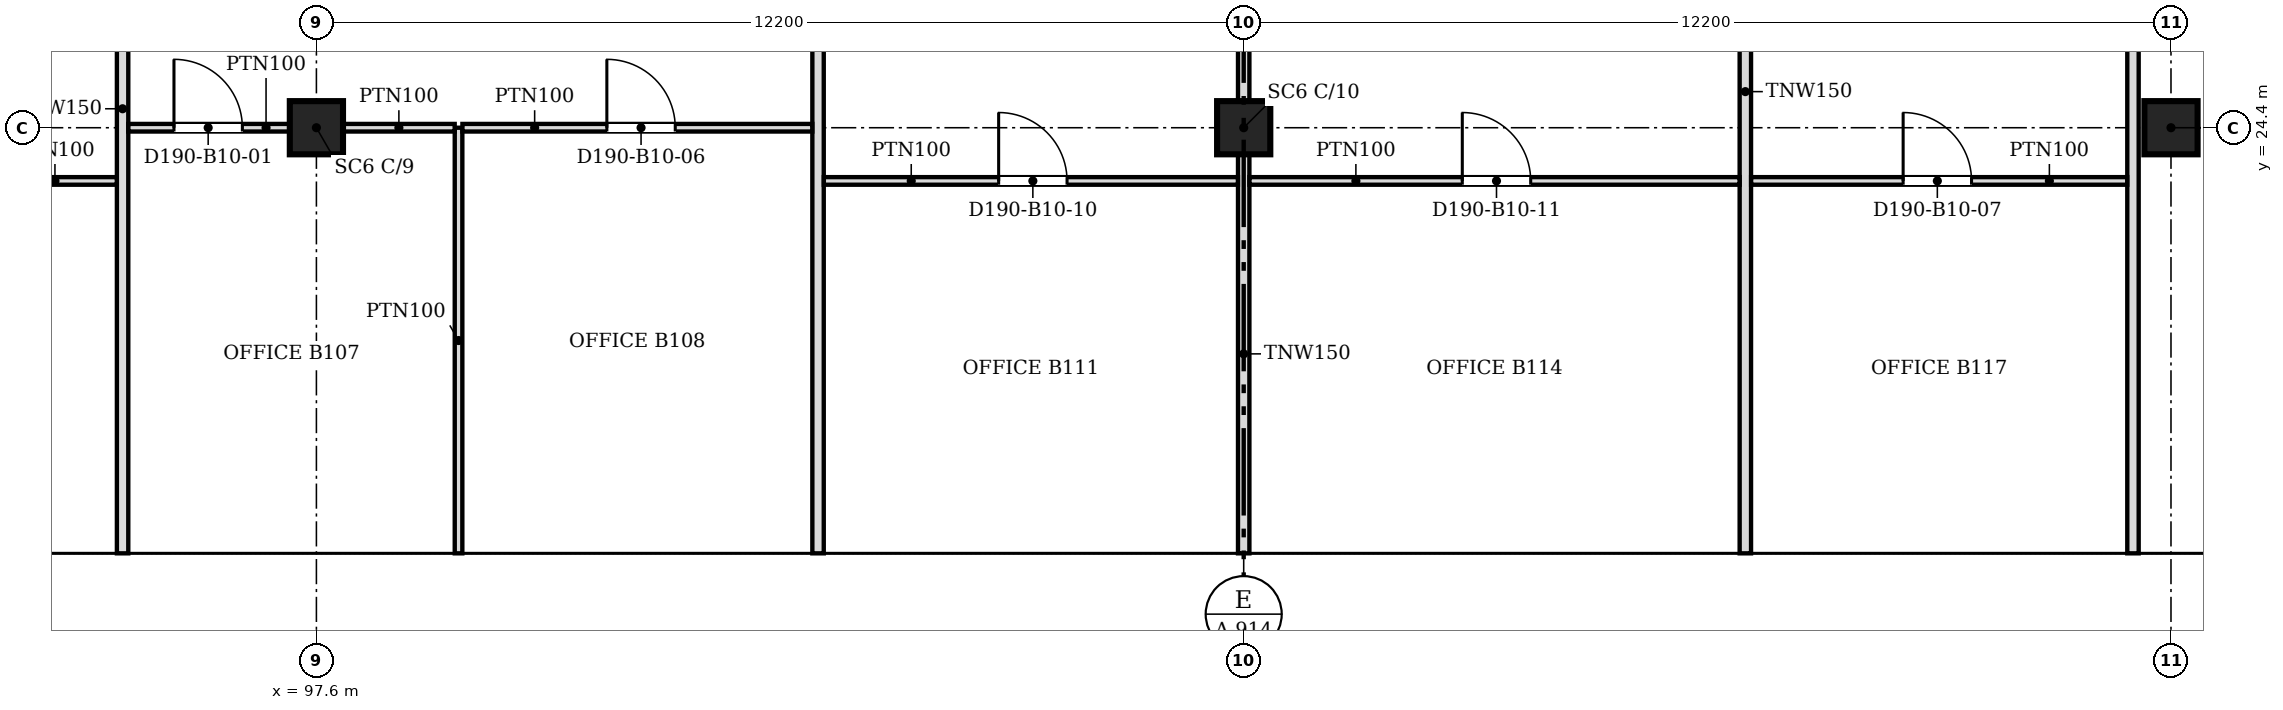
"""IFC4 building model, lengths in metres.
Left out: names, types, materials, properties, quantities, classifications, styles, units other than length and angle.
Written with IfcOpenShell. Run it as: python <this file> out.ifc"""

import sys

from ifc_helpers import new_model, si_unit, direction, frame, frame_2d, origin, origin_2d, place, context, subcontext, project, spatial, polyline, rectangle, outline, extrude, faceted_brep, source, transform, mapped, element, fill, save


model = new_model("IFC4")
c1 = context("Model", 3, precision=1e-05, world=origin(), true_north=direction((0.0, 1.0)))
c2 = subcontext(c1, "Body", "Model", "MODEL_VIEW")
j1 = project(units=[si_unit("LENGTHUNIT", "METRE"), si_unit("PLANEANGLEUNIT", "RADIAN")], contexts=[c1])
p1 = place(None, origin())
s1 = spatial("IfcSite", under=j1, at=p1, CompositionType="ELEMENT")
p2 = place(p1, origin())
s2 = spatial("IfcBuilding", under=s1, at=p2, CompositionType="ELEMENT")
p3 = place(p2, frame((0.0, 0.0, 102.8)))
s3 = spatial("IfcBuildingStorey", under=s2, at=p3, CompositionType="ELEMENT", Elevation=102.8)
for number, where, z_axis, x_axis in (
    (1, (97.6, 24.4, 0.0), (0.0, 0.0, 1.0), (1.0, 0.0, 0.0)),
    (2, (109.8, 24.4, 0.0), (0.0, 0.0, 1.0), (1.0, 0.0, 0.0)),
    (3, (122.0, 24.4, 0.0), (0.0, 0.0, 1.0), (1.0, 0.0, 0.0)),
):
    element("IfcColumn", number, at=place(p3, frame(where, z_axis=z_axis, x_axis=x_axis)), inside=s3, PredefinedType="COLUMN", context=c2, shape_type="SweptSolid", body=[
        extrude(rectangle(XDim=0.7, YDim=0.7, at=origin_2d()), origin(), (0.0, 0.0, 1.0), 3.55),
    ])
m1 = source(origin(), c2, "Body", "Brep", [
    faceted_brep([(0.047, -0.25, 0.0), (3.05, -0.25, 3.8), (0.047, -0.25, 7.6), (0.0, -0.25, 7.54), (0.0, -0.25, 0.06), (0.093, 0.25, 7.541), (3.05, 0.25, 3.8), (0.093, 0.25, 0.059), (0.047, 0.0, 0.0), (0.047, 0.0, 7.6)], [[[0, 1, 2, 3, 4]], [[5, 6, 7]], [[7, 6, 1, 0, 8]], [[6, 5, 9, 2, 1]], [[3, 2, 9]], [[8, 0, 4]], [[7, 8, 4, 3, 9, 5]]]),
])
p4 = place(p3, frame((91.5, 18.55, -3.8), z_axis=(0.0, 0.0, 1.0), x_axis=(1.0, 0.0, 0.0)))
e4 = element("IfcWall", 4, at=p4, inside=s3, PredefinedType="SOLIDWALL", context=c2, shape_type="MappedRepresentation", body=[
    mapped(m1, transform((0.0, 0.0, 0.0), scale=1.0)),
])
m2 = source(origin(), c2, "Body", "SweptSolid", [
    extrude(outline(polyline([(0.247, 0.656), (2.731, 3.8), (0.247, 6.944), (0.247, 0.656)])), frame((0.0, 0.26, 0.0), z_axis=(0.0, -1.0, 0.0), x_axis=(1.0, 0.0, 0.0)), (0.0, 0.0, 1.0), 0.52),
])
p5 = place(p4, origin())
e5 = element("IfcOpeningElement", 5, at=p5, cuts=e4, PredefinedType="OPENING", context=c2, shape_type="MappedRepresentation", body=[
    mapped(m2, transform((0.0, 0.0, 0.0), scale=1.0)),
])
m3 = source(origin(), c2, "Body", "Brep", [
    faceted_brep([(3.05, -0.25, 0.0), (6.1, -0.25, 3.8), (6.1, -0.25, 3.8), (3.05, -0.25, 7.6), (0.0, -0.25, 3.8), (0.0, 0.25, 3.8), (3.05, 0.25, 7.6), (6.1, 0.25, 3.8), (6.1, 0.25, 3.8), (3.05, 0.25, 0.0)], [[[0, 1, 2, 3, 4]], [[5, 6, 7, 8, 9]], [[9, 8, 1, 0]], [[7, 6, 3, 2]], [[6, 5, 4, 3]], [[5, 9, 0, 4]], [[1, 8, 7, 2]]]),
])
p6 = place(p3, frame((94.55, 18.55, -3.8), z_axis=(0.0, 0.0, 1.0), x_axis=(1.0, 0.0, 0.0)))
e6 = element("IfcWall", 6, at=p6, inside=s3, PredefinedType="SOLIDWALL", context=c2, shape_type="MappedRepresentation", body=[
    mapped(m3, transform((0.0, 0.0, 0.0), scale=1.0)),
])
m4 = source(origin(), c2, "Body", "SweptSolid", [
    extrude(outline(polyline([(3.05, 0.399), (5.78, 3.8), (3.05, 7.201), (0.321, 3.8), (3.05, 0.399)])), frame((0.0, 0.26, 0.0), z_axis=(0.0, -1.0, 0.0), x_axis=(1.0, 0.0, 0.0)), (0.0, 0.0, 1.0), 0.52),
])
p7 = place(p6, origin())
e7 = element("IfcOpeningElement", 7, at=p7, cuts=e6, PredefinedType="OPENING", context=c2, shape_type="MappedRepresentation", body=[
    mapped(m4, transform((0.0, 0.0, 0.0), scale=1.0)),
])
m5 = source(origin(), c2, "Body", "SweptSolid", [
    extrude(outline(polyline([(3.05, 0.0), (6.1, 3.8), (3.05, 7.6), (0.0, 3.8), (3.05, 0.0)])), frame((0.0, 0.25, 0.0), z_axis=(0.0, -1.0, 0.0), x_axis=(1.0, 0.0, 0.0)), (0.0, 0.0, 1.0), 0.5),
])
p8 = place(p3, frame((100.65, 18.55, -3.8), z_axis=(0.0, 0.0, 1.0), x_axis=(1.0, 0.0, 0.0)))
e8 = element("IfcWall", 8, at=p8, inside=s3, PredefinedType="SOLIDWALL", context=c2, shape_type="MappedRepresentation", body=[
    mapped(m5, transform((0.0, 0.0, 0.0), scale=1.0)),
])
p9 = place(p8, origin())
e9 = element("IfcOpeningElement", 9, at=p9, cuts=e8, PredefinedType="OPENING", context=c2, shape_type="MappedRepresentation", body=[
    mapped(m4, transform((0.0, 0.0, 0.0), scale=1.0)),
])
p10 = place(p3, frame((106.75, 18.55, -3.8), z_axis=(0.0, 0.0, 1.0), x_axis=(1.0, 0.0, 0.0)))
e10 = element("IfcWall", 10, at=p10, inside=s3, PredefinedType="SOLIDWALL", context=c2, shape_type="MappedRepresentation", body=[
    mapped(m5, transform((0.0, 0.0, 0.0), scale=1.0)),
])
p11 = place(p10, origin())
e11 = element("IfcOpeningElement", 11, at=p11, cuts=e10, PredefinedType="OPENING", context=c2, shape_type="MappedRepresentation", body=[
    mapped(m4, transform((0.0, 0.0, 0.0), scale=1.0)),
])
p12 = place(p3, frame((112.85, 18.55, -3.8), z_axis=(0.0, 0.0, 1.0), x_axis=(1.0, 0.0, 0.0)))
e12 = element("IfcWall", 12, at=p12, inside=s3, PredefinedType="SOLIDWALL", context=c2, shape_type="MappedRepresentation", body=[
    mapped(m3, transform((0.0, 0.0, 0.0), scale=1.0)),
])
p13 = place(p12, origin())
e13 = element("IfcOpeningElement", 13, at=p13, cuts=e12, PredefinedType="OPENING", context=c2, shape_type="MappedRepresentation", body=[
    mapped(m4, transform((0.0, 0.0, 0.0), scale=1.0)),
])
m6 = source(origin(), c2, "Body", "Brep", [
    faceted_brep([(3.05, -0.25, 0.0), (5.85, -0.25, 3.8), (3.05, -0.25, 7.6), (0.0, -0.25, 3.8), (0.0, 0.25, 3.8), (3.05, 0.25, 7.6), (5.6, 0.25, 4.139), (5.6, 0.25, 3.461), (3.05, 0.25, 0.0), (5.85, 0.0, 3.8)], [[[0, 1, 2, 3]], [[4, 5, 6, 7, 8]], [[8, 7, 9, 1, 0]], [[6, 5, 2, 1, 9]], [[5, 4, 3, 2]], [[4, 8, 0, 3]], [[9, 7, 6]]]),
])
p14 = place(p3, frame((118.95, 18.55, -3.8), z_axis=(0.0, 0.0, 1.0), x_axis=(1.0, 0.0, 0.0)))
e14 = element("IfcWall", 14, at=p14, inside=s3, PredefinedType="SOLIDWALL", context=c2, shape_type="MappedRepresentation", body=[
    mapped(m6, transform((0.0, 0.0, 0.0), scale=1.0)),
])
m7 = source(origin(), c2, "Body", "SweptSolid", [
    extrude(outline(polyline([(3.042, 0.41), (5.54, 3.8), (3.042, 7.19), (0.321, 3.8), (3.042, 0.41)])), frame((0.0, 0.26, 0.0), z_axis=(0.0, -1.0, 0.0), x_axis=(1.0, 0.0, 0.0)), (0.0, 0.0, 1.0), 0.52),
])
p15 = place(p14, origin())
e15 = element("IfcOpeningElement", 15, at=p15, cuts=e14, PredefinedType="OPENING", context=c2, shape_type="MappedRepresentation", body=[
    mapped(m7, transform((0.0, 0.0, 0.0), scale=1.0)),
])
m8 = source(origin(), c2, "Body", "Brep", [
    faceted_brep([(3.003, -0.25, 0.0), (6.053, -0.25, 3.8), (0.0, -0.25, 3.8), (0.047, 0.25, 3.8), (6.053, 0.25, 3.8), (3.003, 0.25, 0.0), (0.047, 0.25, 3.741), (0.0, 0.0, 3.8)], [[[0, 1, 2]], [[3, 4, 5, 6]], [[5, 4, 1, 0]], [[4, 3, 7, 2, 1]], [[6, 5, 0, 2, 7]], [[6, 7, 3]]]),
])
p16 = place(p3, frame((91.547, 18.55, 0.0), z_axis=(0.0, 0.0, 1.0), x_axis=(1.0, 0.0, 0.0)))
e16 = element("IfcWall", 16, at=p16, inside=s3, PredefinedType="SOLIDWALL", context=c2, shape_type="MappedRepresentation", body=[
    mapped(m8, transform((0.0, 0.0, 0.0), scale=1.0)),
])
m9 = source(origin(), c2, "Body", "SweptSolid", [
    extrude(outline(polyline([(3.005, 0.401), (5.532, 3.55), (0.516, 3.55), (3.005, 0.401)])), frame((0.0, 0.26, 0.0), z_axis=(0.0, -1.0, 0.0), x_axis=(1.0, 0.0, 0.0)), (0.0, 0.0, 1.0), 0.52),
])
p17 = place(p16, origin())
e17 = element("IfcOpeningElement", 17, at=p17, cuts=e16, PredefinedType="OPENING", context=c2, shape_type="MappedRepresentation", body=[
    mapped(m9, transform((0.0, 0.0, 0.0), scale=1.0)),
])
m10 = source(origin(), c2, "Body", "Brep", [
    faceted_brep([(3.05, -0.25, 0.0), (6.1, -0.25, 3.8), (6.1, -0.25, 3.8), (0.0, -0.25, 3.8), (0.0, 0.25, 3.8), (6.1, 0.25, 3.8), (6.1, 0.25, 3.8), (3.05, 0.25, 0.0)], [[[0, 1, 2, 3]], [[4, 5, 6, 7]], [[7, 6, 1, 0]], [[5, 4, 3, 2]], [[4, 7, 0, 3]], [[1, 6, 5, 2]]]),
])
p18 = place(p3, frame((97.6, 18.55, 0.0), z_axis=(0.0, 0.0, 1.0), x_axis=(1.0, 0.0, 0.0)))
e18 = element("IfcWall", 18, at=p18, inside=s3, PredefinedType="SOLIDWALL", context=c2, shape_type="MappedRepresentation", body=[
    mapped(m10, transform((0.0, 0.0, 0.0), scale=1.0)),
])
m11 = source(origin(), c2, "Body", "SweptSolid", [
    extrude(outline(polyline([(3.05, 0.399), (5.579, 3.55), (0.521, 3.55), (3.05, 0.399)])), frame((0.0, 0.26, 0.0), z_axis=(0.0, -1.0, 0.0), x_axis=(1.0, 0.0, 0.0)), (0.0, 0.0, 1.0), 0.52),
])
p19 = place(p18, origin())
e19 = element("IfcOpeningElement", 19, at=p19, cuts=e18, PredefinedType="OPENING", context=c2, shape_type="MappedRepresentation", body=[
    mapped(m11, transform((0.0, 0.0, 0.0), scale=1.0)),
])
m12 = source(origin(), c2, "Body", "SweptSolid", [
    extrude(outline(polyline([(3.05, 0.0), (6.1, 3.8), (0.0, 3.8), (3.05, 0.0)])), frame((0.0, 0.25, 0.0), z_axis=(0.0, -1.0, 0.0), x_axis=(1.0, 0.0, 0.0)), (0.0, 0.0, 1.0), 0.5),
])
p20 = place(p3, frame((103.7, 18.55, 0.0), z_axis=(0.0, 0.0, 1.0), x_axis=(1.0, 0.0, 0.0)))
e20 = element("IfcWall", 20, at=p20, inside=s3, PredefinedType="SOLIDWALL", context=c2, shape_type="MappedRepresentation", body=[
    mapped(m12, transform((0.0, 0.0, 0.0), scale=1.0)),
])
p21 = place(p20, origin())
e21 = element("IfcOpeningElement", 21, at=p21, cuts=e20, PredefinedType="OPENING", context=c2, shape_type="MappedRepresentation", body=[
    mapped(m11, transform((0.0, 0.0, 0.0), scale=1.0)),
])
p22 = place(p3, frame((109.8, 18.55, 0.0), z_axis=(0.0, 0.0, 1.0), x_axis=(1.0, 0.0, 0.0)))
e22 = element("IfcWall", 22, at=p22, inside=s3, PredefinedType="SOLIDWALL", context=c2, shape_type="MappedRepresentation", body=[
    mapped(m10, transform((0.0, 0.0, 0.0), scale=1.0)),
])
p23 = place(p22, origin())
e23 = element("IfcOpeningElement", 23, at=p23, cuts=e22, PredefinedType="OPENING", context=c2, shape_type="MappedRepresentation", body=[
    mapped(m11, transform((0.0, 0.0, 0.0), scale=1.0)),
])
p24 = place(p3, frame((115.9, 18.55, 0.0), z_axis=(0.0, 0.0, 1.0), x_axis=(1.0, 0.0, 0.0)))
e24 = element("IfcWall", 24, at=p24, inside=s3, PredefinedType="SOLIDWALL", context=c2, shape_type="MappedRepresentation", body=[
    mapped(m12, transform((0.0, 0.0, 0.0), scale=1.0)),
])
p25 = place(p24, origin())
e25 = element("IfcOpeningElement", 25, at=p25, cuts=e24, PredefinedType="OPENING", context=c2, shape_type="MappedRepresentation", body=[
    mapped(m11, transform((0.0, 0.0, 0.0), scale=1.0)),
])
m13 = source(origin(), c2, "Body", "Brep", [
    faceted_brep([(2.8, -0.25, 0.0), (3.05, -0.25, 0.339), (3.05, -0.25, 3.8), (0.0, -0.25, 3.8), (0.0, 0.25, 3.8), (2.55, 0.25, 3.8), (2.55, 0.25, 0.339), (2.8, 0.0, 0.0)], [[[0, 1, 2, 3]], [[4, 5, 6]], [[1, 0, 7]], [[5, 4, 3, 2]], [[4, 6, 7, 0, 3]], [[1, 7, 6, 5, 2]]]),
])
p26 = place(p3, frame((122.0, 18.55, 0.0), z_axis=(0.0, 0.0, 1.0), x_axis=(1.0, 0.0, 0.0)))
e26 = element("IfcWall", 26, at=p26, inside=s3, PredefinedType="SOLIDWALL", context=c2, shape_type="MappedRepresentation", body=[
    mapped(m13, transform((0.0, 0.0, 0.0), scale=1.0)),
])
m14 = source(origin(), c2, "Body", "SweptSolid", [
    extrude(outline(polyline([(2.6, 3.55), (0.495, 3.55), (2.6, 0.693), (2.6, 3.55)])), frame((0.0, 0.26, 0.0), z_axis=(0.0, -1.0, 0.0), x_axis=(1.0, 0.0, 0.0)), (0.0, 0.0, 1.0), 0.52),
])
p27 = place(p26, origin())
e27 = element("IfcOpeningElement", 27, at=p27, cuts=e26, PredefinedType="OPENING", context=c2, shape_type="MappedRepresentation", body=[
    mapped(m14, transform((0.0, 0.0, 0.0), scale=1.0)),
])
p28 = place(p3, frame((95.05, 18.8, 0.0), z_axis=(0.0, 0.0, 1.0), x_axis=(0.0, 1.0, 0.0)))
e28 = element("IfcWall", 28, at=p28, inside=s3, PredefinedType="PARTITIONING", context=c2, shape_type="SweptSolid", body=[
    extrude(rectangle(XDim=11.699, YDim=0.15, at=frame_2d((5.85, 0.0))), origin(), (0.0, 0.0, 1.0), 2.715),
])
p29 = place(p3, frame((99.47, 18.8, 0.0), z_axis=(0.0, 0.0, 1.0), x_axis=(0.0, 1.0, 0.0)))
e29 = element("IfcWall", 29, at=p29, inside=s3, PredefinedType="PARTITIONING", context=c2, shape_type="SweptSolid", body=[
    extrude(rectangle(XDim=5.6, YDim=0.1, at=frame_2d((2.8, 0.0))), origin(), (0.0, 0.0, 1.0), 2.715),
])
p30 = place(p3, frame((104.2, 18.8, 0.0), z_axis=(0.0, 0.0, 1.0), x_axis=(0.0, 1.0, 0.0)))
e30 = element("IfcWall", 30, at=p30, inside=s3, PredefinedType="PARTITIONING", context=c2, shape_type="SweptSolid", body=[
    extrude(rectangle(XDim=15.124, YDim=0.15, at=frame_2d((7.562, 0.0))), origin(), (0.0, 0.0, 1.0), 2.715),
])
p31 = place(p3, frame((109.8, 18.8, 0.0), z_axis=(0.0, 0.0, 1.0), x_axis=(0.0, 1.0, 0.0)))
e31 = element("IfcWall", 31, at=p31, inside=s3, PredefinedType="PARTITIONING", context=c2, shape_type="SweptSolid", body=[
    extrude(rectangle(XDim=5.249, YDim=0.15, at=frame_2d((2.625, 0.0))), origin(), (0.0, 0.0, 1.0), 2.715),
])
p32 = place(p3, frame((116.4, 18.8, 0.0), z_axis=(0.0, 0.0, 1.0), x_axis=(0.0, 1.0, 0.0)))
e32 = element("IfcWall", 32, at=p32, inside=s3, PredefinedType="PARTITIONING", context=c2, shape_type="SweptSolid", body=[
    extrude(rectangle(XDim=12.15, YDim=0.15, at=frame_2d((6.075, 0.0))), origin(), (0.0, 0.0, 1.0), 2.715),
])
p33 = place(p3, frame((121.5, 18.8, 0.0), z_axis=(0.0, 0.0, 1.0), x_axis=(0.0, 1.0, 0.0)))
e33 = element("IfcWall", 33, at=p33, inside=s3, PredefinedType="PARTITIONING", context=c2, shape_type="SweptSolid", body=[
    extrude(rectangle(XDim=15.124, YDim=0.15, at=frame_2d((7.562, 0.0))), origin(), (0.0, 0.0, 1.0), 2.715),
])
p34 = place(p3, frame((94.974, 23.7, 0.0), z_axis=(0.0, 0.0, 1.0), x_axis=(-1.0, 0.0, 0.0)))
e34 = element("IfcWall", 34, at=p34, inside=s3, PredefinedType="PARTITIONING", context=c2, shape_type="SweptSolid", body=[
    extrude(rectangle(XDim=4.128, YDim=0.1, at=frame_2d((2.064, 0.0))), origin(), (0.0, 0.0, 1.0), 2.715),
])
m15 = source(origin(), c2, "Body", "SweptSolid", [
    extrude(rectangle(XDim=0.9, YDim=2.1, at=frame_2d((0.45, 1.05))), frame((0.0, 0.06, 0.0), z_axis=(0.0, -1.0, 0.0), x_axis=(1.0, 0.0, 0.0)), (0.0, 0.0, 1.0), 0.12),
])
p35 = place(p34, frame((1.628, 0.0, 0.0)))
e35 = element("IfcOpeningElement", 35, at=p35, cuts=e34, PredefinedType="OPENING", context=c2, shape_type="MappedRepresentation", body=[
    mapped(m15, transform((0.0, 0.0, 0.0), scale=1.0)),
])
p36 = place(p3, frame((109.724, 23.7, 0.0), z_axis=(0.0, 0.0, 1.0), x_axis=(-1.0, 0.0, 0.0)))
e36 = element("IfcWall", 36, at=p36, inside=s3, PredefinedType="PARTITIONING", context=c2, shape_type="SweptSolid", body=[
    extrude(rectangle(XDim=5.448, YDim=0.1, at=frame_2d((2.724, 0.0))), origin(), (0.0, 0.0, 1.0), 2.715),
])
p37 = place(p36, frame((2.248, 0.0, 0.0)))
e37 = element("IfcOpeningElement", 37, at=p37, cuts=e36, PredefinedType="OPENING", context=c2, shape_type="MappedRepresentation", body=[
    mapped(m15, transform((0.0, 0.0, 0.0), scale=1.0)),
])
p38 = place(p3, frame((116.324, 23.7, 0.0), z_axis=(0.0, 0.0, 1.0), x_axis=(-1.0, 0.0, 0.0)))
e38 = element("IfcWall", 38, at=p38, inside=s3, PredefinedType="PARTITIONING", context=c2, shape_type="SweptSolid", body=[
    extrude(rectangle(XDim=6.448, YDim=0.1, at=frame_2d((3.224, 0.0))), origin(), (0.0, 0.0, 1.0), 2.715),
])
p39 = place(p38, frame((2.748, 0.0, 0.0)))
e39 = element("IfcOpeningElement", 39, at=p39, cuts=e38, PredefinedType="OPENING", context=c2, shape_type="MappedRepresentation", body=[
    mapped(m15, transform((0.0, 0.0, 0.0), scale=1.0)),
])
p40 = place(p3, frame((121.424, 23.7, 0.0), z_axis=(0.0, 0.0, 1.0), x_axis=(-1.0, 0.0, 0.0)))
e40 = element("IfcWall", 40, at=p40, inside=s3, PredefinedType="PARTITIONING", context=c2, shape_type="SweptSolid", body=[
    extrude(rectangle(XDim=4.948, YDim=0.1, at=frame_2d((2.474, 0.0))), origin(), (0.0, 0.0, 1.0), 2.715),
])
p41 = place(p40, frame((2.048, 0.0, 0.0)))
e41 = element("IfcOpeningElement", 41, at=p41, cuts=e40, PredefinedType="OPENING", context=c2, shape_type="MappedRepresentation", body=[
    mapped(m15, transform((0.0, 0.0, 0.0), scale=1.0)),
])
p42 = place(p3, frame((97.249, 24.4, 0.0), z_axis=(0.0, 0.0, 1.0), x_axis=(-1.0, 0.0, 0.0)))
e42 = element("IfcWall", 42, at=p42, inside=s3, PredefinedType="PARTITIONING", context=c2, shape_type="SweptSolid", body=[
    extrude(rectangle(XDim=2.123, YDim=0.1, at=frame_2d((1.062, 0.0))), origin(), (0.0, 0.0, 1.0), 2.715),
])
p43 = place(p42, frame((0.623, 0.0, 0.0)))
e43 = element("IfcOpeningElement", 43, at=p43, cuts=e42, PredefinedType="OPENING", context=c2, shape_type="MappedRepresentation", body=[
    mapped(m15, transform((0.0, 0.0, 0.0), scale=1.0)),
])
p44 = place(p3, frame((97.951, 24.4, 0.0), z_axis=(0.0, 0.0, 1.0), x_axis=(1.0, 0.0, 0.0)))
e44 = element("IfcWall", 44, at=p44, inside=s3, PredefinedType="PARTITIONING", context=c2, shape_type="SweptSolid", body=[
    extrude(rectangle(XDim=1.468, YDim=0.1, at=frame_2d((0.734, 0.0))), origin(), (0.0, 0.0, 1.0), 2.715),
])
p45 = place(p3, frame((104.124, 24.4, 0.0), z_axis=(0.0, 0.0, 1.0), x_axis=(-1.0, 0.0, 0.0)))
e45 = element("IfcWall", 45, at=p45, inside=s3, PredefinedType="PARTITIONING", context=c2, shape_type="SweptSolid", body=[
    extrude(rectangle(XDim=4.603, YDim=0.1, at=frame_2d((2.301, 0.0))), origin(), (0.0, 0.0, 1.0), 2.715),
])
p46 = place(p45, frame((1.803, 0.0, 0.0)))
e46 = element("IfcOpeningElement", 46, at=p46, cuts=e45, PredefinedType="OPENING", context=c2, shape_type="MappedRepresentation", body=[
    mapped(m15, transform((0.0, 0.0, 0.0), scale=1.0)),
])
p47 = place(p3, frame((109.8, 24.751, 0.0), z_axis=(0.0, 0.0, 1.0), x_axis=(0.0, 1.0, 0.0)))
e47 = element("IfcWall", 47, at=p47, inside=s3, PredefinedType="PARTITIONING", context=c2, shape_type="SweptSolid", body=[
    extrude(rectangle(XDim=6.123, YDim=0.15, at=frame_2d((3.062, 0.0))), origin(), (0.0, 0.0, 1.0), 2.715),
])
m16 = source(origin(), c2, "Body", "SweptSolid", [
    extrude(rectangle(XDim=0.9, YDim=2.1, at=frame_2d((0.45, 1.05))), frame((0.0, 0.025, 0.0), z_axis=(0.0, -1.0, 0.0), x_axis=(1.0, 0.0, 0.0)), (0.0, 0.0, 1.0), 0.05),
])
p48 = place(p43, origin())
e48 = element("IfcDoor", 48, at=p48, inside=s3, OperationType="SINGLE_SWING_RIGHT", PredefinedType="DOOR", context=c2, shape_type="MappedRepresentation", body=[
    mapped(m16, transform((0.0, 0.0, 0.0), scale=1.0)),
])
fill(e43, e48)
p49 = place(p46, origin())
e49 = element("IfcDoor", 49, at=p49, inside=s3, OperationType="SINGLE_SWING_RIGHT", PredefinedType="DOOR", context=c2, shape_type="MappedRepresentation", body=[
    mapped(m16, transform((0.0, 0.0, 0.0), scale=1.0)),
])
fill(e46, e49)
p50 = place(p41, origin())
e50 = element("IfcDoor", 50, at=p50, inside=s3, OperationType="SINGLE_SWING_RIGHT", PredefinedType="DOOR", context=c2, shape_type="MappedRepresentation", body=[
    mapped(m16, transform((0.0, 0.0, 0.0), scale=1.0)),
])
fill(e41, e50)
p51 = place(p37, origin())
e51 = element("IfcDoor", 51, at=p51, inside=s3, OperationType="SINGLE_SWING_RIGHT", PredefinedType="DOOR", context=c2, shape_type="MappedRepresentation", body=[
    mapped(m16, transform((0.0, 0.0, 0.0), scale=1.0)),
])
fill(e37, e51)
p52 = place(p39, origin())
e52 = element("IfcDoor", 52, at=p52, inside=s3, OperationType="SINGLE_SWING_RIGHT", PredefinedType="DOOR", context=c2, shape_type="MappedRepresentation", body=[
    mapped(m16, transform((0.0, 0.0, 0.0), scale=1.0)),
])
fill(e39, e52)
save(model, sys.argv[1])
